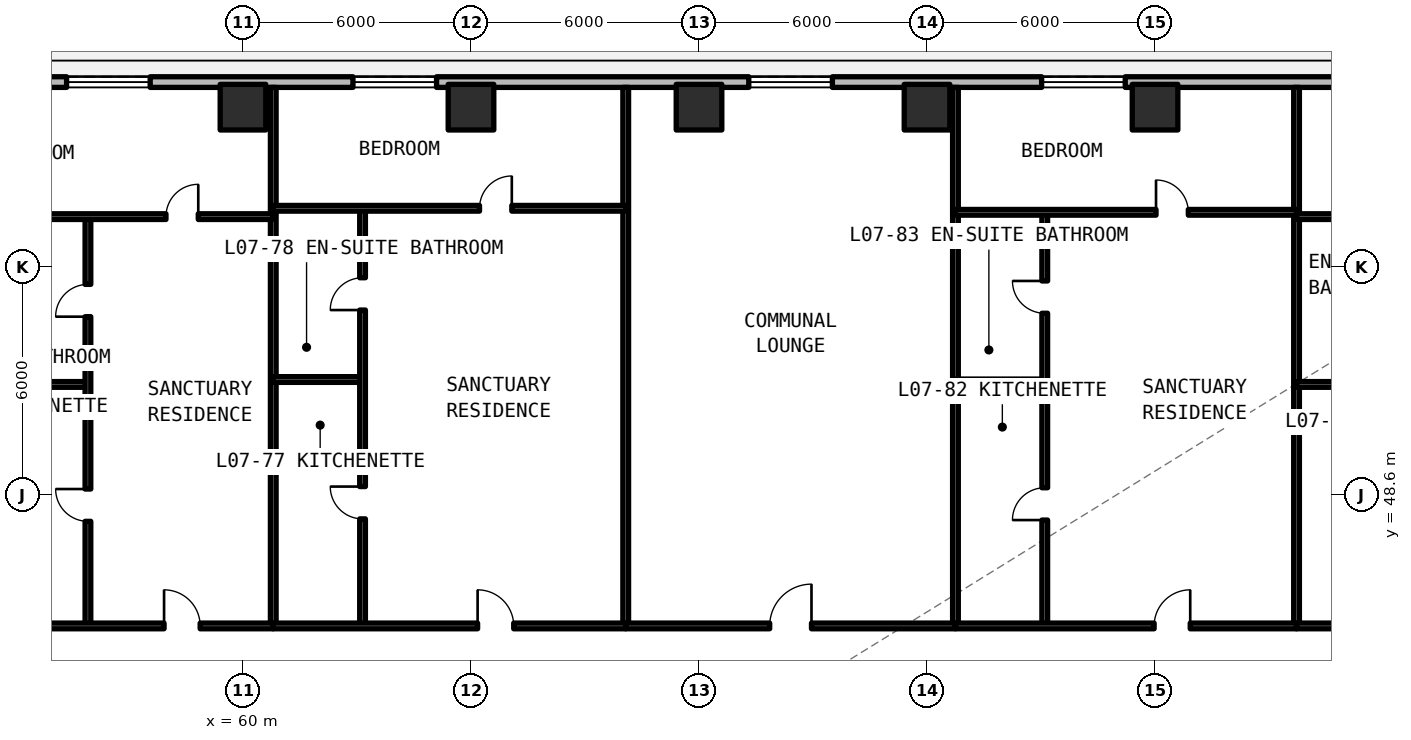
"""IFC4 building model, lengths in metres.
Left out: names, types, materials, properties, quantities, classifications, styles, units other than length and angle.
Written with IfcOpenShell. Run it as: python <this file> out.ifc"""

import sys

from ifc_helpers import new_model, si_unit, direction, frame, frame_2d, origin, origin_2d, place, context, subcontext, project, spatial, rectangle, extrude, element, fill, save


model = new_model("IFC4")
c1 = context("Model", 3, precision=1e-05, world=origin(), true_north=direction((0.0, 1.0)))
c2 = subcontext(c1, "Body", "Model", "MODEL_VIEW")
j1 = project(units=[si_unit("LENGTHUNIT", "METRE"), si_unit("PLANEANGLEUNIT", "RADIAN")], contexts=[c1])
p1 = place(None, origin())
s1 = spatial("IfcSite", under=j1, at=p1, CompositionType="ELEMENT")
p2 = place(p1, origin())
s2 = spatial("IfcBuilding", under=s1, at=p2, CompositionType="ELEMENT")
p3 = place(p2, frame((0.0, 0.0, 29.04)))
s3 = spatial("IfcBuildingStorey", under=s2, at=p3, CompositionType="ELEMENT", Elevation=29.04)
for number, where, z_axis, x_axis in (
    (1, (60.0, 58.8, -0.24), (0.0, 0.0, 1.0), (1.0, 0.0, 0.0)),
    (2, (66.0, 58.8, -0.24), (0.0, 0.0, 1.0), (1.0, 0.0, 0.0)),
    (3, (72.0, 58.8, -0.24), (0.0, 0.0, 1.0), (1.0, 0.0, 0.0)),
    (4, (78.0, 58.8, -0.24), (0.0, 0.0, 1.0), (1.0, 0.0, 0.0)),
    (5, (84.0, 58.8, -0.24), (0.0, 0.0, 1.0), (1.0, 0.0, 0.0)),
):
    element("IfcColumn", number, at=place(p3, frame(where, z_axis=z_axis, x_axis=x_axis)), inside=s3, PredefinedType="COLUMN", context=c2, shape_type="SweptSolid", body=[
        extrude(rectangle(XDim=1.2, YDim=1.2, at=origin_2d()), origin(), (0.0, 0.0, 1.0), 3.54),
    ])
p4 = place(p3, frame((96.542, 59.46, 0.0), z_axis=(0.0, 0.0, 1.0), x_axis=(-1.0, 0.0, 0.0)))
e6 = element("IfcWall", 6, at=p4, inside=s3, PredefinedType="SOLIDWALL", context=c2, shape_type="SweptSolid", body=[
    extrude(rectangle(XDim=44.402, YDim=0.28, at=frame_2d((22.201, 0.0))), origin(), (0.0, 0.0, 1.0), 3.08),
])
p5 = place(p4, frame((38.984, 0.0, 0.78)))
e7 = element("IfcOpeningElement", 7, at=p5, cuts=e6, PredefinedType="OPENING", context=c2, shape_type="SweptSolid", body=[
    extrude(rectangle(XDim=2.2, YDim=1.66, at=frame_2d((1.1, 0.83))), frame((0.0, 0.15, 0.0), z_axis=(0.0, -1.0, 0.0), x_axis=(1.0, 0.0, 0.0)), (0.0, 0.0, 1.0), 0.3),
])
p6 = place(p4, frame((31.448, 0.0, 0.78)))
e8 = element("IfcOpeningElement", 8, at=p6, cuts=e6, PredefinedType="OPENING", context=c2, shape_type="SweptSolid", body=[
    extrude(rectangle(XDim=2.2, YDim=1.66, at=frame_2d((1.1, 0.83))), frame((0.0, 0.15, 0.0), z_axis=(0.0, -1.0, 0.0), x_axis=(1.0, 0.0, 0.0)), (0.0, 0.0, 1.0), 0.3),
])
p7 = place(p4, frame((21.032, 0.0, 0.78)))
e9 = element("IfcOpeningElement", 9, at=p7, cuts=e6, PredefinedType="OPENING", context=c2, shape_type="SweptSolid", body=[
    extrude(rectangle(XDim=2.2, YDim=1.66, at=frame_2d((1.1, 0.83))), frame((0.0, 0.15, 0.0), z_axis=(0.0, -1.0, 0.0), x_axis=(1.0, 0.0, 0.0)), (0.0, 0.0, 1.0), 0.3),
])
p8 = place(p4, frame((13.326, 0.0, 0.78)))
e10 = element("IfcOpeningElement", 10, at=p8, cuts=e6, PredefinedType="OPENING", context=c2, shape_type="SweptSolid", body=[
    extrude(rectangle(XDim=2.2, YDim=1.66, at=frame_2d((1.1, 0.83))), frame((0.0, 0.15, 0.0), z_axis=(0.0, -1.0, 0.0), x_axis=(1.0, 0.0, 0.0)), (0.0, 0.0, 1.0), 0.3),
])
p9 = place(p4, frame((3.38, 0.0, 0.78)))
e11 = element("IfcOpeningElement", 11, at=p9, cuts=e6, PredefinedType="OPENING", context=c2, shape_type="SweptSolid", body=[
    extrude(rectangle(XDim=2.2, YDim=1.66, at=frame_2d((1.1, 0.83))), frame((0.0, 0.15, 0.0), z_axis=(0.0, -1.0, 0.0), x_axis=(1.0, 0.0, 0.0)), (0.0, 0.0, 1.0), 0.3),
])
p10 = place(p3, frame((60.796, 45.15, 0.0), z_axis=(0.0, 0.0, 1.0), x_axis=(0.0, 1.0, 0.0)))
e12 = element("IfcWall", 12, at=p10, inside=s3, PredefinedType="SOLIDWALL", context=c2, shape_type="SweptSolid", body=[
    extrude(rectangle(XDim=14.17, YDim=0.15, at=frame_2d((7.085, 0.0))), origin(), (0.0, 0.0, 1.0), 2.35),
])
p11 = place(p3, frame((52.12, 51.504, 0.0), z_axis=(0.0, 0.0, 1.0), x_axis=(1.0, 0.0, 0.0)))
e13 = element("IfcWall", 13, at=p11, inside=s3, PredefinedType="PARTITIONING", context=c2, shape_type="SweptSolid", body=[
    extrude(rectangle(XDim=3.8, YDim=0.15, at=frame_2d((1.9, 0.0))), origin(), (0.0, 0.0, 1.0), 2.35),
])
p12 = place(p3, frame((55.92, 45.15, 0.0), z_axis=(0.0, 0.0, 1.0), x_axis=(0.0, 1.0, 0.0)))
e14 = element("IfcWall", 14, at=p12, inside=s3, PredefinedType="PARTITIONING", context=c2, shape_type="SweptSolid", body=[
    extrude(rectangle(XDim=10.77, YDim=0.15, at=frame_2d((5.385, 0.0))), origin(), (0.0, 0.0, 1.0), 2.35),
])
p13 = place(p12, frame((2.752, 0.0, 0.0)))
e15 = element("IfcOpeningElement", 15, at=p13, cuts=e14, PredefinedType="OPENING", context=c2, shape_type="SweptSolid", body=[
    extrude(rectangle(XDim=0.85, YDim=2.1, at=frame_2d((0.425, 1.05))), frame((0.0, 0.085, 0.0), z_axis=(0.0, -1.0, 0.0), x_axis=(1.0, 0.0, 0.0)), (0.0, 0.0, 1.0), 0.17),
])
p14 = place(p12, frame((8.137, 0.0, 0.0)))
e16 = element("IfcOpeningElement", 16, at=p14, cuts=e14, PredefinedType="OPENING", context=c2, shape_type="SweptSolid", body=[
    extrude(rectangle(XDim=0.85, YDim=2.1, at=frame_2d((0.425, 1.05))), frame((0.0, 0.085, 0.0), z_axis=(0.0, -1.0, 0.0), x_axis=(1.0, 0.0, 0.0)), (0.0, 0.0, 1.0), 0.17),
])
p15 = place(p3, frame((52.12, 55.92, 0.0), z_axis=(0.0, 0.0, 1.0), x_axis=(1.0, 0.0, 0.0)))
e17 = element("IfcWall", 17, at=p15, inside=s3, PredefinedType="PARTITIONING", context=c2, shape_type="SweptSolid", body=[
    extrude(rectangle(XDim=8.676, YDim=0.15, at=frame_2d((4.338, 0.0))), origin(), (0.0, 0.0, 1.0), 2.35),
])
p16 = place(p15, frame((5.853, 0.0, 0.0)))
e18 = element("IfcOpeningElement", 18, at=p16, cuts=e17, PredefinedType="OPENING", context=c2, shape_type="SweptSolid", body=[
    extrude(rectangle(XDim=0.85, YDim=2.1, at=frame_2d((0.425, 1.05))), frame((0.0, 0.085, 0.0), z_axis=(0.0, -1.0, 0.0), x_axis=(1.0, 0.0, 0.0)), (0.0, 0.0, 1.0), 0.17),
])
p17 = place(p3, frame((52.12, 45.15, 0.0), z_axis=(0.0, 0.0, 1.0), x_axis=(1.0, 0.0, 0.0)))
e19 = element("IfcWall", 19, at=p17, inside=s3, PredefinedType="SOLIDWALL", context=c2, shape_type="SweptSolid", body=[
    extrude(rectangle(XDim=8.676, YDim=0.15, at=frame_2d((4.338, 0.0))), origin(), (0.0, 0.0, 1.0), 2.35),
])
p18 = place(p17, frame((5.803, 0.0, 0.0)))
e20 = element("IfcOpeningElement", 20, at=p18, cuts=e19, PredefinedType="OPENING", context=c2, shape_type="SweptSolid", body=[
    extrude(rectangle(XDim=0.95, YDim=2.15, at=frame_2d((0.475, 1.075))), frame((0.0, 0.085, 0.0), z_axis=(0.0, -1.0, 0.0), x_axis=(1.0, 0.0, 0.0)), (0.0, 0.0, 1.0), 0.17),
])
p19 = place(p3, frame((70.071, 45.15, 0.0), z_axis=(0.0, 0.0, 1.0), x_axis=(0.0, 1.0, 0.0)))
e21 = element("IfcWall", 21, at=p19, inside=s3, PredefinedType="SOLIDWALL", context=c2, shape_type="SweptSolid", body=[
    extrude(rectangle(XDim=14.17, YDim=0.15, at=frame_2d((7.085, 0.0))), origin(), (0.0, 0.0, 1.0), 2.35),
])
p20 = place(p3, frame((60.796, 51.634, 0.0), z_axis=(0.0, 0.0, 1.0), x_axis=(1.0, 0.0, 0.0)))
e22 = element("IfcWall", 22, at=p20, inside=s3, PredefinedType="PARTITIONING", context=c2, shape_type="SweptSolid", body=[
    extrude(rectangle(XDim=2.35, YDim=0.15, at=frame_2d((1.175, 0.0))), origin(), (0.0, 0.0, 1.0), 2.35),
])
p21 = place(p3, frame((63.146, 45.15, 0.0), z_axis=(0.0, 0.0, 1.0), x_axis=(0.0, 1.0, 0.0)))
e23 = element("IfcWall", 23, at=p21, inside=s3, PredefinedType="PARTITIONING", context=c2, shape_type="SweptSolid", body=[
    extrude(rectangle(XDim=10.99, YDim=0.15, at=frame_2d((5.495, 0.0))), origin(), (0.0, 0.0, 1.0), 2.35),
])
p22 = place(p21, frame((2.817, 0.0, 0.0)))
e24 = element("IfcOpeningElement", 24, at=p22, cuts=e23, PredefinedType="OPENING", context=c2, shape_type="SweptSolid", body=[
    extrude(rectangle(XDim=0.85, YDim=2.1, at=frame_2d((0.425, 1.05))), frame((0.0, 0.085, 0.0), z_axis=(0.0, -1.0, 0.0), x_axis=(1.0, 0.0, 0.0)), (0.0, 0.0, 1.0), 0.17),
])
p23 = place(p21, frame((8.312, 0.0, 0.0)))
e25 = element("IfcOpeningElement", 25, at=p23, cuts=e23, PredefinedType="OPENING", context=c2, shape_type="SweptSolid", body=[
    extrude(rectangle(XDim=0.85, YDim=2.1, at=frame_2d((0.425, 1.05))), frame((0.0, 0.085, 0.0), z_axis=(0.0, -1.0, 0.0), x_axis=(1.0, 0.0, 0.0)), (0.0, 0.0, 1.0), 0.17),
])
p24 = place(p3, frame((60.796, 56.139, 0.0), z_axis=(0.0, 0.0, 1.0), x_axis=(1.0, 0.0, 0.0)))
e26 = element("IfcWall", 26, at=p24, inside=s3, PredefinedType="PARTITIONING", context=c2, shape_type="SweptSolid", body=[
    extrude(rectangle(XDim=9.275, YDim=0.15, at=frame_2d((4.637, 0.0))), origin(), (0.0, 0.0, 1.0), 2.35),
])
p25 = place(p24, frame((5.427, 0.0, 0.0)))
e27 = element("IfcOpeningElement", 27, at=p25, cuts=e26, PredefinedType="OPENING", context=c2, shape_type="SweptSolid", body=[
    extrude(rectangle(XDim=0.85, YDim=2.1, at=frame_2d((0.425, 1.05))), frame((0.0, 0.085, 0.0), z_axis=(0.0, -1.0, 0.0), x_axis=(1.0, 0.0, 0.0)), (0.0, 0.0, 1.0), 0.17),
])
p26 = place(p3, frame((60.796, 45.15, 0.0), z_axis=(0.0, 0.0, 1.0), x_axis=(1.0, 0.0, 0.0)))
e28 = element("IfcWall", 28, at=p26, inside=s3, PredefinedType="SOLIDWALL", context=c2, shape_type="SweptSolid", body=[
    extrude(rectangle(XDim=9.275, YDim=0.15, at=frame_2d((4.637, 0.0))), origin(), (0.0, 0.0, 1.0), 2.35),
])
p27 = place(p26, frame((5.377, 0.0, 0.0)))
e29 = element("IfcOpeningElement", 29, at=p27, cuts=e28, PredefinedType="OPENING", context=c2, shape_type="SweptSolid", body=[
    extrude(rectangle(XDim=0.95, YDim=2.15, at=frame_2d((0.475, 1.075))), frame((0.0, 0.085, 0.0), z_axis=(0.0, -1.0, 0.0), x_axis=(1.0, 0.0, 0.0)), (0.0, 0.0, 1.0), 0.17),
])
p28 = place(p3, frame((78.748, 45.15, 0.0), z_axis=(0.0, 0.0, 1.0), x_axis=(0.0, 1.0, 0.0)))
e30 = element("IfcWall", 30, at=p28, inside=s3, PredefinedType="SOLIDWALL", context=c2, shape_type="SweptSolid", body=[
    extrude(rectangle(XDim=14.17, YDim=0.15, at=frame_2d((7.085, 0.0))), origin(), (0.0, 0.0, 1.0), 2.35),
])
p29 = place(p3, frame((70.071, 45.15, 0.0), z_axis=(0.0, 0.0, 1.0), x_axis=(1.0, 0.0, 0.0)))
e31 = element("IfcWall", 31, at=p29, inside=s3, PredefinedType="SOLIDWALL", context=c2, shape_type="SweptSolid", body=[
    extrude(rectangle(XDim=8.677, YDim=0.15, at=frame_2d((4.338, 0.0))), origin(), (0.0, 0.0, 1.0), 2.35),
])
p30 = place(p29, frame((3.788, 0.0, 0.0)))
e32 = element("IfcOpeningElement", 32, at=p30, cuts=e31, PredefinedType="OPENING", context=c2, shape_type="SweptSolid", body=[
    extrude(rectangle(XDim=1.1, YDim=2.15, at=frame_2d((0.55, 1.075))), frame((0.0, 0.085, 0.0), z_axis=(0.0, -1.0, 0.0), x_axis=(1.0, 0.0, 0.0)), (0.0, 0.0, 1.0), 0.17),
])
p31 = place(p3, frame((87.724, 45.15, 0.0), z_axis=(0.0, 0.0, 1.0), x_axis=(0.0, 1.0, 0.0)))
e33 = element("IfcWall", 33, at=p31, inside=s3, PredefinedType="SOLIDWALL", context=c2, shape_type="SweptSolid", body=[
    extrude(rectangle(XDim=14.17, YDim=0.15, at=frame_2d((7.085, 0.0))), origin(), (0.0, 0.0, 1.0), 2.35),
])
p32 = place(p3, frame((78.748, 51.571, 0.0), z_axis=(0.0, 0.0, 1.0), x_axis=(1.0, 0.0, 0.0)))
e34 = element("IfcWall", 34, at=p32, inside=s3, PredefinedType="PARTITIONING", context=c2, shape_type="SweptSolid", body=[
    extrude(rectangle(XDim=2.35, YDim=0.15, at=frame_2d((1.175, 0.0))), origin(), (0.0, 0.0, 1.0), 2.35),
])
p33 = place(p3, frame((81.098, 45.15, 0.0), z_axis=(0.0, 0.0, 1.0), x_axis=(0.0, 1.0, 0.0)))
e35 = element("IfcWall", 35, at=p33, inside=s3, PredefinedType="PARTITIONING", context=c2, shape_type="SweptSolid", body=[
    extrude(rectangle(XDim=10.883, YDim=0.15, at=frame_2d((5.442, 0.0))), origin(), (0.0, 0.0, 1.0), 2.35),
])
p34 = place(p33, frame((2.786, 0.0, 0.0)))
e36 = element("IfcOpeningElement", 36, at=p34, cuts=e35, PredefinedType="OPENING", context=c2, shape_type="SweptSolid", body=[
    extrude(rectangle(XDim=0.85, YDim=2.1, at=frame_2d((0.425, 1.05))), frame((0.0, 0.085, 0.0), z_axis=(0.0, -1.0, 0.0), x_axis=(1.0, 0.0, 0.0)), (0.0, 0.0, 1.0), 0.17),
])
p35 = place(p33, frame((8.227, 0.0, 0.0)))
e37 = element("IfcOpeningElement", 37, at=p35, cuts=e35, PredefinedType="OPENING", context=c2, shape_type="SweptSolid", body=[
    extrude(rectangle(XDim=0.85, YDim=2.1, at=frame_2d((0.425, 1.05))), frame((0.0, 0.085, 0.0), z_axis=(0.0, -1.0, 0.0), x_axis=(1.0, 0.0, 0.0)), (0.0, 0.0, 1.0), 0.17),
])
p36 = place(p3, frame((78.748, 56.033, 0.0), z_axis=(0.0, 0.0, 1.0), x_axis=(1.0, 0.0, 0.0)))
e38 = element("IfcWall", 38, at=p36, inside=s3, PredefinedType="PARTITIONING", context=c2, shape_type="SweptSolid", body=[
    extrude(rectangle(XDim=8.976, YDim=0.15, at=frame_2d((4.488, 0.0))), origin(), (0.0, 0.0, 1.0), 2.35),
])
p37 = place(p36, frame((5.278, 0.0, 0.0)))
e39 = element("IfcOpeningElement", 39, at=p37, cuts=e38, PredefinedType="OPENING", context=c2, shape_type="SweptSolid", body=[
    extrude(rectangle(XDim=0.85, YDim=2.1, at=frame_2d((0.425, 1.05))), frame((0.0, 0.085, 0.0), z_axis=(0.0, -1.0, 0.0), x_axis=(1.0, 0.0, 0.0)), (0.0, 0.0, 1.0), 0.17),
])
p38 = place(p3, frame((78.748, 45.15, 0.0), z_axis=(0.0, 0.0, 1.0), x_axis=(1.0, 0.0, 0.0)))
e40 = element("IfcWall", 40, at=p38, inside=s3, PredefinedType="SOLIDWALL", context=c2, shape_type="SweptSolid", body=[
    extrude(rectangle(XDim=8.976, YDim=0.15, at=frame_2d((4.488, 0.0))), origin(), (0.0, 0.0, 1.0), 2.35),
])
p39 = place(p38, frame((5.228, 0.0, 0.0)))
e41 = element("IfcOpeningElement", 41, at=p39, cuts=e40, PredefinedType="OPENING", context=c2, shape_type="SweptSolid", body=[
    extrude(rectangle(XDim=0.95, YDim=2.15, at=frame_2d((0.475, 1.075))), frame((0.0, 0.085, 0.0), z_axis=(0.0, -1.0, 0.0), x_axis=(1.0, 0.0, 0.0)), (0.0, 0.0, 1.0), 0.17),
])
p40 = place(p3, frame((87.724, 51.504, 0.0), z_axis=(0.0, 0.0, 1.0), x_axis=(1.0, 0.0, 0.0)))
e42 = element("IfcWall", 42, at=p40, inside=s3, PredefinedType="PARTITIONING", context=c2, shape_type="SweptSolid", body=[
    extrude(rectangle(XDim=4.196, YDim=0.15, at=frame_2d((2.098, 0.0))), origin(), (0.0, 0.0, 1.0), 2.35),
])
p41 = place(p3, frame((87.724, 55.92, 0.0), z_axis=(0.0, 0.0, 1.0), x_axis=(1.0, 0.0, 0.0)))
e43 = element("IfcWall", 43, at=p41, inside=s3, PredefinedType="PARTITIONING", context=c2, shape_type="SweptSolid", body=[
    extrude(rectangle(XDim=8.676, YDim=0.15, at=frame_2d((4.338, 0.0))), origin(), (0.0, 0.0, 1.0), 2.35),
])
p42 = place(p41, frame((6.052, 0.0, 0.0)))
e44 = element("IfcOpeningElement", 44, at=p42, cuts=e43, PredefinedType="OPENING", context=c2, shape_type="SweptSolid", body=[
    extrude(rectangle(XDim=0.85, YDim=2.1, at=frame_2d((0.425, 1.05))), frame((0.0, 0.085, 0.0), z_axis=(0.0, -1.0, 0.0), x_axis=(1.0, 0.0, 0.0)), (0.0, 0.0, 1.0), 0.17),
])
p43 = place(p3, frame((87.724, 45.15, 0.0), z_axis=(0.0, 0.0, 1.0), x_axis=(1.0, 0.0, 0.0)))
e45 = element("IfcWall", 45, at=p43, inside=s3, PredefinedType="SOLIDWALL", context=c2, shape_type="SweptSolid", body=[
    extrude(rectangle(XDim=8.676, YDim=0.15, at=frame_2d((4.338, 0.0))), origin(), (0.0, 0.0, 1.0), 2.35),
])
p44 = place(p43, frame((6.001, 0.0, 0.0)))
e46 = element("IfcOpeningElement", 46, at=p44, cuts=e45, PredefinedType="OPENING", context=c2, shape_type="SweptSolid", body=[
    extrude(rectangle(XDim=0.95, YDim=2.15, at=frame_2d((0.475, 1.075))), frame((0.0, 0.085, 0.0), z_axis=(0.0, -1.0, 0.0), x_axis=(1.0, 0.0, 0.0)), (0.0, 0.0, 1.0), 0.17),
])
p45 = place(p5, origin())
e47 = element("IfcWindow", 47, at=p45, inside=s3, PartitioningType="SINGLE_PANEL", PredefinedType="WINDOW", context=c2, shape_type="SweptSolid", body=[
    extrude(rectangle(XDim=2.2, YDim=1.66, at=frame_2d((1.1, 0.83))), frame((0.0, 0.03, 0.0), z_axis=(0.0, -1.0, 0.0), x_axis=(1.0, 0.0, 0.0)), (0.0, 0.0, 1.0), 0.06),
])
fill(e7, e47)
p46 = place(p6, origin())
e48 = element("IfcWindow", 48, at=p46, inside=s3, PartitioningType="SINGLE_PANEL", PredefinedType="WINDOW", context=c2, shape_type="SweptSolid", body=[
    extrude(rectangle(XDim=2.2, YDim=1.66, at=frame_2d((1.1, 0.83))), frame((0.0, 0.03, 0.0), z_axis=(0.0, -1.0, 0.0), x_axis=(1.0, 0.0, 0.0)), (0.0, 0.0, 1.0), 0.06),
])
fill(e8, e48)
p47 = place(p7, origin())
e49 = element("IfcWindow", 49, at=p47, inside=s3, PartitioningType="SINGLE_PANEL", PredefinedType="WINDOW", context=c2, shape_type="SweptSolid", body=[
    extrude(rectangle(XDim=2.2, YDim=1.66, at=frame_2d((1.1, 0.83))), frame((0.0, 0.03, 0.0), z_axis=(0.0, -1.0, 0.0), x_axis=(1.0, 0.0, 0.0)), (0.0, 0.0, 1.0), 0.06),
])
fill(e9, e49)
p48 = place(p8, origin())
e50 = element("IfcWindow", 50, at=p48, inside=s3, PartitioningType="SINGLE_PANEL", PredefinedType="WINDOW", context=c2, shape_type="SweptSolid", body=[
    extrude(rectangle(XDim=2.2, YDim=1.66, at=frame_2d((1.1, 0.83))), frame((0.0, 0.03, 0.0), z_axis=(0.0, -1.0, 0.0), x_axis=(1.0, 0.0, 0.0)), (0.0, 0.0, 1.0), 0.06),
])
fill(e10, e50)
p49 = place(p13, origin())
e51 = element("IfcDoor", 51, at=p49, inside=s3, OperationType="SINGLE_SWING_RIGHT", PredefinedType="DOOR", context=c2, shape_type="SweptSolid", body=[
    extrude(rectangle(XDim=0.85, YDim=2.1, at=frame_2d((0.425, 1.05))), frame((0.0, 0.025, 0.0), z_axis=(0.0, -1.0, 0.0), x_axis=(1.0, 0.0, 0.0)), (0.0, 0.0, 1.0), 0.05),
])
fill(e15, e51)
p50 = place(p14, origin())
e52 = element("IfcDoor", 52, at=p50, inside=s3, OperationType="SINGLE_SWING_LEFT", PredefinedType="DOOR", context=c2, shape_type="SweptSolid", body=[
    extrude(rectangle(XDim=0.85, YDim=2.1, at=frame_2d((0.425, 1.05))), frame((0.0, 0.025, 0.0), z_axis=(0.0, -1.0, 0.0), x_axis=(1.0, 0.0, 0.0)), (0.0, 0.0, 1.0), 0.05),
])
fill(e16, e52)
p51 = place(p16, origin())
e53 = element("IfcDoor", 53, at=p51, inside=s3, OperationType="SINGLE_SWING_RIGHT", PredefinedType="DOOR", context=c2, shape_type="SweptSolid", body=[
    extrude(rectangle(XDim=0.85, YDim=2.1, at=frame_2d((0.425, 1.05))), frame((0.0, 0.025, 0.0), z_axis=(0.0, -1.0, 0.0), x_axis=(1.0, 0.0, 0.0)), (0.0, 0.0, 1.0), 0.05),
])
fill(e18, e53)
p52 = place(p18, origin())
e54 = element("IfcDoor", 54, at=p52, inside=s3, OperationType="SINGLE_SWING_LEFT", PredefinedType="DOOR", context=c2, shape_type="SweptSolid", body=[
    extrude(rectangle(XDim=0.95, YDim=2.15, at=frame_2d((0.475, 1.075))), frame((0.0, 0.025, 0.0), z_axis=(0.0, -1.0, 0.0), x_axis=(1.0, 0.0, 0.0)), (0.0, 0.0, 1.0), 0.05),
])
fill(e20, e54)
p53 = place(p22, origin())
e55 = element("IfcDoor", 55, at=p53, inside=s3, OperationType="SINGLE_SWING_RIGHT", PredefinedType="DOOR", context=c2, shape_type="SweptSolid", body=[
    extrude(rectangle(XDim=0.85, YDim=2.1, at=frame_2d((0.425, 1.05))), frame((0.0, 0.025, 0.0), z_axis=(0.0, -1.0, 0.0), x_axis=(1.0, 0.0, 0.0)), (0.0, 0.0, 1.0), 0.05),
])
fill(e24, e55)
p54 = place(p23, origin())
e56 = element("IfcDoor", 56, at=p54, inside=s3, OperationType="SINGLE_SWING_LEFT", PredefinedType="DOOR", context=c2, shape_type="SweptSolid", body=[
    extrude(rectangle(XDim=0.85, YDim=2.1, at=frame_2d((0.425, 1.05))), frame((0.0, 0.025, 0.0), z_axis=(0.0, -1.0, 0.0), x_axis=(1.0, 0.0, 0.0)), (0.0, 0.0, 1.0), 0.05),
])
fill(e25, e56)
p55 = place(p25, origin())
e57 = element("IfcDoor", 57, at=p55, inside=s3, OperationType="SINGLE_SWING_RIGHT", PredefinedType="DOOR", context=c2, shape_type="SweptSolid", body=[
    extrude(rectangle(XDim=0.85, YDim=2.1, at=frame_2d((0.425, 1.05))), frame((0.0, 0.025, 0.0), z_axis=(0.0, -1.0, 0.0), x_axis=(1.0, 0.0, 0.0)), (0.0, 0.0, 1.0), 0.05),
])
fill(e27, e57)
p56 = place(p27, origin())
e58 = element("IfcDoor", 58, at=p56, inside=s3, OperationType="SINGLE_SWING_LEFT", PredefinedType="DOOR", context=c2, shape_type="SweptSolid", body=[
    extrude(rectangle(XDim=0.95, YDim=2.15, at=frame_2d((0.475, 1.075))), frame((0.0, 0.025, 0.0), z_axis=(0.0, -1.0, 0.0), x_axis=(1.0, 0.0, 0.0)), (0.0, 0.0, 1.0), 0.05),
])
fill(e29, e58)
p57 = place(p30, origin())
e59 = element("IfcDoor", 59, at=p57, inside=s3, OperationType="SINGLE_SWING_RIGHT", PredefinedType="DOOR", context=c2, shape_type="SweptSolid", body=[
    extrude(rectangle(XDim=1.1, YDim=2.15, at=frame_2d((0.55, 1.075))), frame((0.0, 0.025, 0.0), z_axis=(0.0, -1.0, 0.0), x_axis=(1.0, 0.0, 0.0)), (0.0, 0.0, 1.0), 0.05),
])
fill(e32, e59)
p58 = place(p34, origin())
e60 = element("IfcDoor", 60, at=p58, inside=s3, OperationType="SINGLE_SWING_LEFT", PredefinedType="DOOR", context=c2, shape_type="SweptSolid", body=[
    extrude(rectangle(XDim=0.85, YDim=2.1, at=frame_2d((0.425, 1.05))), frame((0.0, 0.025, 0.0), z_axis=(0.0, -1.0, 0.0), x_axis=(1.0, 0.0, 0.0)), (0.0, 0.0, 1.0), 0.05),
])
fill(e36, e60)
p59 = place(p35, origin())
e61 = element("IfcDoor", 61, at=p59, inside=s3, OperationType="SINGLE_SWING_RIGHT", PredefinedType="DOOR", context=c2, shape_type="SweptSolid", body=[
    extrude(rectangle(XDim=0.85, YDim=2.1, at=frame_2d((0.425, 1.05))), frame((0.0, 0.025, 0.0), z_axis=(0.0, -1.0, 0.0), x_axis=(1.0, 0.0, 0.0)), (0.0, 0.0, 1.0), 0.05),
])
fill(e37, e61)
p60 = place(p37, origin())
e62 = element("IfcDoor", 62, at=p60, inside=s3, OperationType="SINGLE_SWING_LEFT", PredefinedType="DOOR", context=c2, shape_type="SweptSolid", body=[
    extrude(rectangle(XDim=0.85, YDim=2.1, at=frame_2d((0.425, 1.05))), frame((0.0, 0.025, 0.0), z_axis=(0.0, -1.0, 0.0), x_axis=(1.0, 0.0, 0.0)), (0.0, 0.0, 1.0), 0.05),
])
fill(e39, e62)
p61 = place(p39, origin())
e63 = element("IfcDoor", 63, at=p61, inside=s3, OperationType="SINGLE_SWING_RIGHT", PredefinedType="DOOR", context=c2, shape_type="SweptSolid", body=[
    extrude(rectangle(XDim=0.95, YDim=2.15, at=frame_2d((0.475, 1.075))), frame((0.0, 0.025, 0.0), z_axis=(0.0, -1.0, 0.0), x_axis=(1.0, 0.0, 0.0)), (0.0, 0.0, 1.0), 0.05),
])
fill(e41, e63)
save(model, sys.argv[1])
